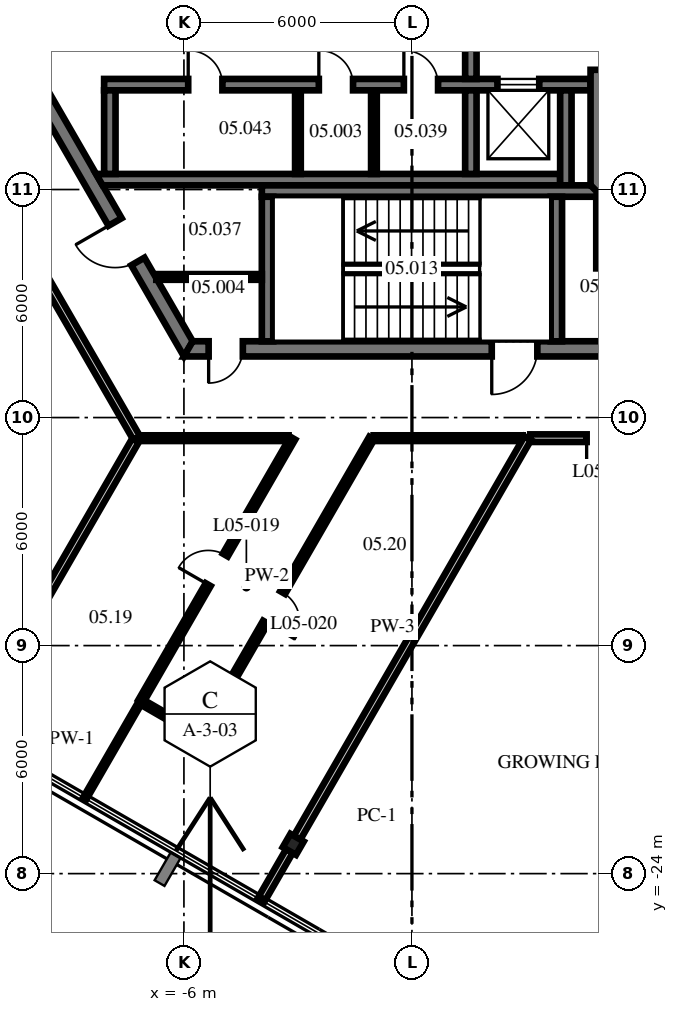
"""IFC4 building model, lengths in metres.
Left out: names, types, materials, properties, quantities, classifications, styles, units other than length and angle.
Written with IfcOpenShell. Run it as: python <this file> out.ifc"""

import sys

from ifc_helpers import new_model, si_unit, direction, frame, frame_2d, origin, origin_2d, place, context, subcontext, project, spatial, polyline, rectangle, i_section, outline, extrude, source, transform, mapped, element, fill, save


model = new_model("IFC4")
c1 = context("Model", 3, precision=1e-05, world=origin(), true_north=direction((0.0, 1.0)))
c2 = subcontext(c1, "Body", "Model", "MODEL_VIEW")
j1 = project(units=[si_unit("LENGTHUNIT", "METRE"), si_unit("PLANEANGLEUNIT", "RADIAN")], contexts=[c1])
p1 = place(None, origin())
s1 = spatial("IfcSite", under=j1, at=p1, CompositionType="ELEMENT")
p2 = place(p1, origin())
s2 = spatial("IfcBuilding", under=s1, at=p2, CompositionType="ELEMENT")
p3 = place(p2, frame((0.0, 0.0, 24.6)))
s3 = spatial("IfcBuildingStorey", under=s2, at=p3, CompositionType="ELEMENT", Elevation=24.6)
m1 = source(origin(), c2, "Body", "SweptSolid", [
    extrude(i_section(OverallWidth=0.404, OverallDepth=0.406, WebThickness=0.027, FlangeThickness=0.044, at=origin_2d()), origin(), (0.0, 0.0, 1.0), 4.3),
])
p4 = place(p3, frame((-3.124, -23.23, 0.0), z_axis=(0.0, 0.0, 1.0), x_axis=(0.866025403784, -0.5, 0.0)))
e1 = element("IfcColumn", 1, at=p4, inside=s3, PredefinedType="COLUMN", context=c2, shape_type="MappedRepresentation", body=[
    mapped(m1, transform((0.0, 0.0, 0.0), scale=1.0)),
])
m2 = source(origin(), c2, "Body", "SweptSolid", [
    extrude(outline(polyline([(-0.115, -0.2), (11.885, -0.2), (11.654, 0.2), (0.115, 0.2), (-0.115, -0.2)])), origin(), (0.0, 0.0, 1.0), 4.1),
])
p5 = place(p3, frame((-11.769, 0.0, 0.0), z_axis=(0.0, 0.0, 1.0), x_axis=(0.499996592174, -0.866027371285, 0.0)))
e2 = element("IfcWall", 2, at=p5, inside=s3, PredefinedType="SHEAR", context=c2, shape_type="MappedRepresentation", body=[
    mapped(m2, transform((0.0, 0.0, 0.0), scale=1.0)),
])
p6 = place(p5, frame((1.405, 0.0, 0.0)))
e3 = element("IfcOpeningElement", 3, at=p6, cuts=e2, PredefinedType="OPENING", context=c2, shape_type="SweptSolid", body=[
    extrude(rectangle(XDim=1.8, YDim=2.1, at=frame_2d((0.9, 1.05))), frame((0.0, 0.21, 0.0), z_axis=(0.0, -1.0, 0.0), x_axis=(1.0, 0.0, 0.0)), (0.0, 0.0, 1.0), 0.42),
])
p7 = place(p5, frame((7.915, 0.0, 0.0)))
e4 = element("IfcOpeningElement", 4, at=p7, cuts=e2, PredefinedType="OPENING", context=c2, shape_type="SweptSolid", body=[
    extrude(rectangle(XDim=1.2, YDim=2.1, at=frame_2d((0.6, 1.05))), frame((0.0, 0.21, 0.0), z_axis=(0.0, -1.0, 0.0), x_axis=(1.0, 0.0, 0.0)), (0.0, 0.0, 1.0), 0.42),
])
p8 = place(p3, frame((-5.885, -10.192, 0.0), z_axis=(0.0, 0.0, 1.0), x_axis=(1.0, 0.0, 0.0)))
e5 = element("IfcWall", 5, at=p8, inside=s3, PredefinedType="SHEAR", context=c2, shape_type="MappedRepresentation", body=[
    mapped(m2, transform((0.0, 0.0, 0.0), scale=1.0)),
])
p9 = place(p8, frame((7.985, 0.0, 0.0)))
e6 = element("IfcOpeningElement", 6, at=p9, cuts=e5, PredefinedType="OPENING", context=c2, shape_type="SweptSolid", body=[
    extrude(rectangle(XDim=1.2, YDim=2.1, at=frame_2d((0.6, 1.05))), frame((0.0, 0.21, 0.0), z_axis=(0.0, -1.0, 0.0), x_axis=(1.0, 0.0, 0.0)), (0.0, 0.0, 1.0), 0.42),
])
p10 = place(p8, frame((0.534, 0.0, 0.0)))
e7 = element("IfcOpeningElement", 7, at=p10, cuts=e5, PredefinedType="OPENING", context=c2, shape_type="SweptSolid", body=[
    extrude(rectangle(XDim=0.9, YDim=2.1, at=frame_2d((0.45, 1.05))), frame((0.0, 0.21, 0.0), z_axis=(0.0, -1.0, 0.0), x_axis=(1.0, 0.0, 0.0)), (0.0, 0.0, 1.0), 0.42),
])
m3 = source(origin(), c2, "Body", "SweptSolid", [
    extrude(rectangle(XDim=12.8, YDim=0.3, at=frame_2d((6.4, 0.0))), origin(), (0.0, 0.0, 1.0), 4.1),
])
p11 = place(p3, frame((-8.1, -3.24, 0.0), z_axis=(0.0, 0.0, 1.0), x_axis=(1.0, 0.0, 0.0)))
e8 = element("IfcWall", 8, at=p11, inside=s3, PredefinedType="SHEAR", context=c2, shape_type="MappedRepresentation", body=[
    mapped(m3, transform((0.0, 0.0, 0.0), scale=1.0)),
])
p12 = place(p11, frame((2.212, 0.0, 0.0)))
e9 = element("IfcOpeningElement", 9, at=p12, cuts=e8, PredefinedType="OPENING", context=c2, shape_type="SweptSolid", body=[
    extrude(rectangle(XDim=0.9, YDim=2.1, at=frame_2d((0.45, 1.05))), frame((0.0, 0.16, 0.0), z_axis=(0.0, -1.0, 0.0), x_axis=(1.0, 0.0, 0.0)), (0.0, 0.0, 1.0), 0.32),
])
p13 = place(p11, frame((5.65, 0.0, 0.0)))
e10 = element("IfcOpeningElement", 10, at=p13, cuts=e8, PredefinedType="OPENING", context=c2, shape_type="SweptSolid", body=[
    extrude(rectangle(XDim=0.9, YDim=2.1, at=frame_2d((0.45, 1.05))), frame((0.0, 0.16, 0.0), z_axis=(0.0, -1.0, 0.0), x_axis=(1.0, 0.0, 0.0)), (0.0, 0.0, 1.0), 0.32),
])
p14 = place(p11, frame((7.887, 0.0, 0.0)))
e11 = element("IfcOpeningElement", 11, at=p14, cuts=e8, PredefinedType="OPENING", context=c2, shape_type="SweptSolid", body=[
    extrude(rectangle(XDim=0.9, YDim=2.1, at=frame_2d((0.45, 1.05))), frame((0.0, 0.16, 0.0), z_axis=(0.0, -1.0, 0.0), x_axis=(1.0, 0.0, 0.0)), (0.0, 0.0, 1.0), 0.32),
])
p15 = place(p11, frame((10.35, 0.0, 0.0)))
e12 = element("IfcOpeningElement", 12, at=p15, cuts=e8, PredefinedType="OPENING", context=c2, shape_type="SweptSolid", body=[
    extrude(rectangle(XDim=1.1, YDim=2.1, at=frame_2d((0.55, 1.05))), frame((0.0, 0.16, 0.0), z_axis=(0.0, -1.0, 0.0), x_axis=(1.0, 0.0, 0.0)), (0.0, 0.0, 1.0), 0.32),
])
m4 = source(origin(), c2, "Body", "SweptSolid", [
    extrude(outline(polyline([(12.0, -0.15), (-0.04, -0.15), (-0.213, 0.15), (12.0, 0.15), (12.0, -0.15)])), origin(), (0.0, 0.0, 1.0), 4.1),
])
p16 = place(p3, frame((-8.1, -5.74, 0.0), z_axis=(0.0, 0.0, 1.0), x_axis=(1.0, 0.0, 0.0)))
e13 = element("IfcWall", 13, at=p16, inside=s3, PredefinedType="SHEAR", context=c2, shape_type="MappedRepresentation", body=[
    mapped(m4, transform((0.0, 0.0, 0.0), scale=1.0)),
])
m5 = source(origin(), c2, "Body", "SweptSolid", [
    extrude(rectangle(XDim=2.2, YDim=0.3, at=frame_2d((1.1, 0.0))), origin(), (0.0, 0.0, 1.0), 4.1),
])
for number, where, z_axis, x_axis in (
    (14, (-7.95, -5.59, 0.0), (0.0, 0.0, 1.0), (0.0, 1.0, 0.0)),
    (15, (1.55, -5.59, 0.0), (0.0, 0.0, 1.0), (0.0, 1.0, 0.0)),
):
    element("IfcWall", number, at=place(p3, frame(where, z_axis=z_axis, x_axis=x_axis)), inside=s3, PredefinedType="SHEAR", context=c2, shape_type="MappedRepresentation", body=[
        mapped(m5, transform((0.0, 0.0, 0.0), scale=1.0)),
    ])
m6 = source(origin(), c2, "Body", "SweptSolid", [
    extrude(rectangle(XDim=2.5, YDim=0.3, at=frame_2d((1.25, 0.0))), origin(), (0.0, 0.0, 1.0), 4.1),
])
p17 = place(p3, frame((4.05, -5.89, 0.0), z_axis=(0.0, 0.0, 1.0), x_axis=(0.0, 1.0, 0.0)))
e16 = element("IfcWall", 16, at=p17, inside=s3, PredefinedType="SHEAR", context=c2, shape_type="MappedRepresentation", body=[
    mapped(m6, transform((0.0, 0.0, 0.0), scale=1.0)),
])
m7 = source(origin(), c2, "Body", "SweptSolid", [
    extrude(rectangle(XDim=3.0, YDim=0.3, at=frame_2d((1.5, 0.0))), origin(), (0.0, 0.0, 1.0), 4.1),
])
p18 = place(p3, frame((1.55, -3.09, 0.0), z_axis=(0.0, 0.0, 1.0), x_axis=(0.0, 1.0, 0.0)))
e17 = element("IfcWall", 17, at=p18, inside=s3, PredefinedType="SHEAR", context=c2, shape_type="MappedRepresentation", body=[
    mapped(m7, transform((0.0, 0.0, 0.0), scale=1.0)),
])
p19 = place(p18, frame((0.9, 0.0, 0.0)))
e18 = element("IfcOpeningElement", 18, at=p19, cuts=e17, PredefinedType="OPENING", context=c2, shape_type="SweptSolid", body=[
    extrude(rectangle(XDim=1.2, YDim=2.1, at=frame_2d((0.6, 1.05))), frame((0.0, 0.16, 0.0), z_axis=(0.0, -1.0, 0.0), x_axis=(1.0, 0.0, 0.0)), (0.0, 0.0, 1.0), 0.32),
])
m8 = source(origin(), c2, "Body", "SweptSolid", [
    extrude(outline(polyline([(-0.15, -0.15), (9.99, -0.15), (9.99, 0.15), (0.15, 0.15), (-0.15, -0.15)])), origin(), (0.0, 0.0, 1.0), 4.1),
])
p20 = place(p3, frame((4.85, -6.04, 0.0), z_axis=(0.0, 0.0, 1.0), x_axis=(0.0, 1.0, 0.0)))
e19 = element("IfcWall", 19, at=p20, inside=s3, PredefinedType="SHEAR", context=c2, shape_type="MappedRepresentation", body=[
    mapped(m8, transform((0.0, 0.0, 0.0), scale=1.0)),
])
p21 = place(p20, frame((3.19, 0.0, 0.0)))
e20 = element("IfcOpeningElement", 20, at=p21, cuts=e19, PredefinedType="OPENING", context=c2, shape_type="SweptSolid", body=[
    extrude(rectangle(XDim=1.1, YDim=2.1, at=frame_2d((0.55, 1.05))), frame((0.0, 0.16, 0.0), z_axis=(0.0, -1.0, 0.0), x_axis=(1.0, 0.0, 0.0)), (0.0, 0.0, 1.0), 0.32),
])
m9 = source(origin(), c2, "Body", "SweptSolid", [
    extrude(outline(polyline([(0.0, -0.15), (8.95, -0.15), (8.65, 0.15), (0.0, 0.15), (0.0, -0.15)])), origin(), (0.0, 0.0, 1.0), 4.1),
])
p22 = place(p3, frame((-3.95, -6.04, 0.0), z_axis=(0.0, 0.0, 1.0), x_axis=(1.0, 0.0, 0.0)))
e21 = element("IfcWall", 21, at=p22, inside=s3, PredefinedType="SHEAR", context=c2, shape_type="MappedRepresentation", body=[
    mapped(m9, transform((0.0, 0.0, 0.0), scale=1.0)),
])
m10 = source(origin(), c2, "Body", "SweptSolid", [
    extrude(outline(polyline([(3.8, -0.15), (-0.004, -0.15), (-0.004, 0.15), (3.8, 0.15), (3.8, -0.15)])), origin(), (0.0, 0.0, 1.0), 4.1),
])
for number, where, z_axis, x_axis in (
    (22, (-3.8, -9.99, 0.0), (0.0, 0.0, 1.0), (0.0, 1.0, 0.0)),
    (23, (3.8, -9.99, 0.0), (0.0, 0.0, 1.0), (0.0, 1.0, 0.0)),
):
    element("IfcWall", number, at=place(p3, frame(where, z_axis=z_axis, x_axis=x_axis)), inside=s3, PredefinedType="SHEAR", context=c2, shape_type="MappedRepresentation", body=[
        mapped(m10, transform((0.0, 0.0, 0.0), scale=1.0)),
    ])
m11 = source(origin(), c2, "Body", "SweptSolid", [
    extrude(rectangle(XDim=2.2, YDim=0.15, at=frame_2d((1.1, 0.0))), origin(), (0.0, 0.0, 1.0), 4.1),
])
for number, where, z_axis, x_axis in (
    (24, (-3.0, -5.59, 0.0), (0.0, 0.0, 1.0), (0.0, 1.0, 0.0)),
    (25, (-1.0, -5.59, 0.0), (0.0, 0.0, 1.0), (0.0, 1.0, 0.0)),
):
    element("IfcWall", number, at=place(p3, frame(where, z_axis=z_axis, x_axis=x_axis)), inside=s3, PredefinedType="PARTITIONING", context=c2, shape_type="MappedRepresentation", body=[
        mapped(m11, transform((0.0, 0.0, 0.0), scale=1.0)),
    ])
m12 = source(origin(), c2, "Body", "SweptSolid", [
    extrude(rectangle(XDim=2.777, YDim=0.15, at=frame_2d((1.389, 0.0))), origin(), (0.0, 0.0, 1.0), 4.1),
])
p23 = place(p3, frame((-6.727, -8.3, 0.0), z_axis=(0.0, 0.0, 1.0), x_axis=(1.0, 0.0, 0.0)))
e26 = element("IfcWall", 26, at=p23, inside=s3, PredefinedType="PARTITIONING", context=c2, shape_type="MappedRepresentation", body=[
    mapped(m12, transform((0.0, 0.0, 0.0), scale=1.0)),
])
m13 = source(origin(), c2, "Body", "SweptSolid", [
    extrude(rectangle(XDim=1.885, YDim=0.15, at=frame_2d((0.942, 0.0))), origin(), (0.0, 0.0, 1.0), 4.1),
])
p24 = place(p3, frame((4.925, -8.075, 0.0), z_axis=(0.0, 0.0, 1.0), x_axis=(0.0, 1.0, 0.0)))
e27 = element("IfcWall", 27, at=p24, inside=s3, PredefinedType="PARTITIONING", context=c2, shape_type="MappedRepresentation", body=[
    mapped(m13, transform((0.0, 0.0, 0.0), scale=1.0)),
])
m14 = source(origin(), c2, "Body", "SweptSolid", [
    extrude(rectangle(XDim=8.229, YDim=0.2, at=frame_2d((4.115, 0.0))), origin(), (0.0, 0.0, 1.0), 4.1),
])
p25 = place(p3, frame((-11.356, -5.416, 0.0), z_axis=(0.0, 0.0, 1.0), x_axis=(0.500012644715, -0.866018103232, 0.0)))
e28 = element("IfcWall", 28, at=p25, inside=s3, PredefinedType="PARTITIONING", context=c2, shape_type="MappedRepresentation", body=[
    mapped(m14, transform((0.0, 0.0, 0.0), scale=1.0)),
])
m15 = source(origin(), c2, "Body", "SweptSolid", [
    extrude(rectangle(XDim=1.69, YDim=0.15, at=frame_2d((0.845, 0.0))), origin(), (0.0, 0.0, 1.0), 4.1),
])
p26 = place(p3, frame((-7.084, -19.5, 0.0), z_axis=(0.0, 0.0, 1.0), x_axis=(0.866002725405, -0.500039278049, 0.0)))
e29 = element("IfcWall", 29, at=p26, inside=s3, PredefinedType="PARTITIONING", context=c2, shape_type="MappedRepresentation", body=[
    mapped(m15, transform((0.0, 0.0, 0.0), scale=1.0)),
])
m16 = source(origin(), c2, "Body", "SweptSolid", [
    extrude(rectangle(XDim=3.925, YDim=0.15, at=frame_2d((1.962, 0.0))), origin(), (0.0, 0.0, 1.0), 4.1),
])
p27 = place(p3, frame((-7.171, -12.542, 0.0), z_axis=(0.0, 0.0, 1.0), x_axis=(1.0, 0.0, 0.0)))
e30 = element("IfcWall", 30, at=p27, inside=s3, PredefinedType="PARTITIONING", context=c2, shape_type="MappedRepresentation", body=[
    mapped(m16, transform((0.0, 0.0, 0.0), scale=1.0)),
])
m17 = source(origin(), c2, "Body", "SweptSolid", [
    extrude(rectangle(XDim=3.921, YDim=0.15, at=frame_2d((1.961, 0.0))), origin(), (0.0, 0.0, 1.0), 4.1),
])
p28 = place(p3, frame((-1.008, -12.542, 0.0), z_axis=(0.0, 0.0, 1.0), x_axis=(1.0, 0.0, 0.0)))
e31 = element("IfcWall", 31, at=p28, inside=s3, PredefinedType="PARTITIONING", context=c2, shape_type="MappedRepresentation", body=[
    mapped(m17, transform((0.0, 0.0, 0.0), scale=1.0)),
])
m18 = source(origin(), c2, "Body", "SweptSolid", [
    extrude(rectangle(XDim=4.098, YDim=0.2, at=frame_2d((2.049, 0.0))), origin(), (0.0, 0.0, 1.0), 4.1),
])
p29 = place(p3, frame((3.114, -12.542, 0.0), z_axis=(0.0, 0.0, 1.0), x_axis=(1.0, 0.0, 0.0)))
e32 = element("IfcWall", 32, at=p29, inside=s3, PredefinedType="PARTITIONING", context=c2, shape_type="MappedRepresentation", body=[
    mapped(m18, transform((0.0, 0.0, 0.0), scale=1.0)),
])
p30 = place(p29, frame((1.483, 0.0, 0.0)))
e33 = element("IfcOpeningElement", 33, at=p30, cuts=e32, PredefinedType="OPENING", context=c2, shape_type="SweptSolid", body=[
    extrude(rectangle(XDim=1.0, YDim=2.1, at=frame_2d((0.5, 1.05))), frame((0.0, 0.11, 0.0), z_axis=(0.0, -1.0, 0.0), x_axis=(1.0, 0.0, 0.0)), (0.0, 0.0, 1.0), 0.22),
])
m19 = source(origin(), c2, "Body", "SweptSolid", [
    extrude(rectangle(XDim=1.499, YDim=0.2, at=frame_2d((0.75, 0.0))), origin(), (0.0, 0.0, 1.0), 4.1),
])
p31 = place(p3, frame((-3.969, -24.695, 0.0), z_axis=(0.0, 0.0, 1.0), x_axis=(0.499905760005, 0.866079806435, 0.0)))
e34 = element("IfcWall", 34, at=p31, inside=s3, PredefinedType="PARTITIONING", context=c2, shape_type="MappedRepresentation", body=[
    mapped(m19, transform((0.0, 0.0, 0.0), scale=1.0)),
])
m20 = source(origin(), c2, "Body", "SweptSolid", [
    extrude(rectangle(XDim=12.148, YDim=0.2, at=frame_2d((6.074, 0.0))), origin(), (0.0, 0.0, 1.0), 3.343),
])
p32 = place(p3, frame((-3.027, -23.063, 0.0), z_axis=(0.0, 0.0, 1.0), x_axis=(0.499997320042, 0.866026951053, 0.0)))
e35 = element("IfcWall", 35, at=p32, inside=s3, PredefinedType="PARTITIONING", context=c2, shape_type="MappedRepresentation", body=[
    mapped(m20, transform((0.0, 0.0, 0.0), scale=1.0)),
])
m21 = source(origin(), c2, "Body", "SweptSolid", [
    extrude(rectangle(XDim=9.039, YDim=0.15, at=frame_2d((4.519, 0.0))), origin(), (0.0, 0.0, 1.0), 4.1),
])
p33 = place(p3, frame((-5.577, -20.37, 0.0), z_axis=(0.0, 0.0, 1.0), x_axis=(0.499999912267, 0.866025454437, 0.0)))
e36 = element("IfcWall", 36, at=p33, inside=s3, PredefinedType="PARTITIONING", context=c2, shape_type="MappedRepresentation", body=[
    mapped(m21, transform((0.0, 0.0, 0.0), scale=1.0)),
])
p34 = place(p33, frame((3.449, 0.0, 0.0)))
e37 = element("IfcOpeningElement", 37, at=p34, cuts=e36, PredefinedType="OPENING", context=c2, shape_type="SweptSolid", body=[
    extrude(rectangle(XDim=0.9, YDim=2.1, at=frame_2d((0.45, 1.05))), frame((0.0, 0.085, 0.0), z_axis=(0.0, -1.0, 0.0), x_axis=(1.0, 0.0, 0.0)), (0.0, 0.0, 1.0), 0.17),
])
m22 = source(origin(), c2, "Body", "SweptSolid", [
    extrude(rectangle(XDim=2.941, YDim=0.1, at=frame_2d((1.47, 0.0))), origin(), (0.0, 0.0, 1.0), 4.1),
])
p35 = place(p3, frame((-8.607, -22.018, 0.0), z_axis=(0.0, 0.0, 1.0), x_axis=(0.500005104963, 0.866022456413, 0.0)))
e38 = element("IfcWall", 38, at=p35, inside=s3, PredefinedType="PARTITIONING", context=c2, shape_type="MappedRepresentation", body=[
    mapped(m22, transform((0.0, 0.0, 0.0), scale=1.0)),
])
m23 = source(origin(), c2, "Body", "SweptSolid", [
    extrude(rectangle(XDim=8.0, YDim=0.15, at=frame_2d((4.0, 0.0))), origin(), (0.0, 0.0, 1.0), 4.1),
])
p36 = place(p3, frame((-7.136, -19.47, 0.0), z_axis=(0.0, 0.0, 1.0), x_axis=(0.500002489515, 0.866023966458, 0.0)))
e39 = element("IfcWall", 39, at=p36, inside=s3, PredefinedType="PARTITIONING", context=c2, shape_type="MappedRepresentation", body=[
    mapped(m23, transform((0.0, 0.0, 0.0), scale=1.0)),
])
p37 = place(p36, frame((3.549, 0.0, 0.0)))
e40 = element("IfcOpeningElement", 40, at=p37, cuts=e39, PredefinedType="OPENING", context=c2, shape_type="SweptSolid", body=[
    extrude(rectangle(XDim=0.9, YDim=2.1, at=frame_2d((0.45, 1.05))), frame((0.0, 0.085, 0.0), z_axis=(0.0, -1.0, 0.0), x_axis=(1.0, 0.0, 0.0)), (0.0, 0.0, 1.0), 0.17),
])
m24 = source(origin(), c2, "Body", "SweptSolid", [
    extrude(rectangle(XDim=6.934, YDim=0.2, at=frame_2d((3.467, 0.0))), origin(), (0.0, 0.0, 1.0), 3.488),
])
p38 = place(p3, frame((-10.743, -18.608, 0.0), z_axis=(0.0, 0.0, 1.0), x_axis=(0.499986605379, 0.866033137035, 0.0)))
e41 = element("IfcWall", 41, at=p38, inside=s3, PredefinedType="PARTITIONING", context=c2, shape_type="MappedRepresentation", body=[
    mapped(m24, transform((0.0, 0.0, 0.0), scale=1.0)),
])
p39 = place(p9, frame((1.2, 0.0, 0.0), z_axis=(0.0, 0.0, 1.0), x_axis=(-1.0, 0.0, 0.0)))
e42 = element("IfcDoor", 42, at=p39, inside=s3, OperationType="SINGLE_SWING_RIGHT", PredefinedType="DOOR", context=c2, shape_type="SweptSolid", body=[
    extrude(rectangle(XDim=1.2, YDim=2.1, at=frame_2d((0.6, 1.05))), frame((0.0, 0.025, 0.0), z_axis=(0.0, -1.0, 0.0), x_axis=(1.0, 0.0, 0.0)), (0.0, 0.0, 1.0), 0.05),
])
fill(e6, e42)
p40 = place(p21, frame((1.1, 0.0, 0.0), z_axis=(0.0, 0.0, 1.0), x_axis=(-1.0, 0.0, 0.0)))
e43 = element("IfcDoor", 43, at=p40, inside=s3, OperationType="SINGLE_SWING_RIGHT", PredefinedType="DOOR", context=c2, shape_type="SweptSolid", body=[
    extrude(rectangle(XDim=1.1, YDim=2.1, at=frame_2d((0.55, 1.05))), frame((0.0, 0.025, 0.0), z_axis=(0.0, -1.0, 0.0), x_axis=(1.0, 0.0, 0.0)), (0.0, 0.0, 1.0), 0.05),
])
fill(e20, e43)
p41 = place(p12, origin())
e44 = element("IfcDoor", 44, at=p41, inside=s3, OperationType="SINGLE_SWING_LEFT", PredefinedType="DOOR", context=c2, shape_type="SweptSolid", body=[
    extrude(rectangle(XDim=0.9, YDim=2.1, at=frame_2d((0.45, 1.05))), frame((0.0, 0.025, 0.0), z_axis=(0.0, -1.0, 0.0), x_axis=(1.0, 0.0, 0.0)), (0.0, 0.0, 1.0), 0.05),
])
fill(e9, e44)
p42 = place(p13, origin())
e45 = element("IfcDoor", 45, at=p42, inside=s3, OperationType="SINGLE_SWING_LEFT", PredefinedType="DOOR", context=c2, shape_type="SweptSolid", body=[
    extrude(rectangle(XDim=0.9, YDim=2.1, at=frame_2d((0.45, 1.05))), frame((0.0, 0.025, 0.0), z_axis=(0.0, -1.0, 0.0), x_axis=(1.0, 0.0, 0.0)), (0.0, 0.0, 1.0), 0.05),
])
fill(e10, e45)
p43 = place(p14, origin())
e46 = element("IfcDoor", 46, at=p43, inside=s3, OperationType="SINGLE_SWING_LEFT", PredefinedType="DOOR", context=c2, shape_type="SweptSolid", body=[
    extrude(rectangle(XDim=0.9, YDim=2.1, at=frame_2d((0.45, 1.05))), frame((0.0, 0.025, 0.0), z_axis=(0.0, -1.0, 0.0), x_axis=(1.0, 0.0, 0.0)), (0.0, 0.0, 1.0), 0.05),
])
fill(e11, e46)
p44 = place(p7, frame((1.2, 0.0, 0.0), z_axis=(0.0, 0.0, 1.0), x_axis=(-1.0, 0.0, 0.0)))
e47 = element("IfcDoor", 47, at=p44, inside=s3, OperationType="SINGLE_SWING_RIGHT", PredefinedType="DOOR", context=c2, shape_type="SweptSolid", body=[
    extrude(rectangle(XDim=1.2, YDim=2.1, at=frame_2d((0.6, 1.05))), frame((0.0, 0.025, 0.0), z_axis=(0.0, -1.0, 0.0), x_axis=(1.0, 0.0, 0.0)), (0.0, 0.0, 1.0), 0.05),
])
fill(e4, e47)
p45 = place(p10, frame((0.9, 0.0, 0.0), z_axis=(0.0, 0.0, 1.0), x_axis=(-1.0, 0.0, 0.0)))
e48 = element("IfcDoor", 48, at=p45, inside=s3, OperationType="SINGLE_SWING_RIGHT", PredefinedType="DOOR", context=c2, shape_type="SweptSolid", body=[
    extrude(rectangle(XDim=0.9, YDim=2.1, at=frame_2d((0.45, 1.05))), frame((0.0, 0.025, 0.0), z_axis=(0.0, -1.0, 0.0), x_axis=(1.0, 0.0, 0.0)), (0.0, 0.0, 1.0), 0.05),
])
fill(e7, e48)
p46 = place(p15, origin())
e49 = element("IfcDoor", 49, at=p46, inside=s3, OperationType="DOUBLE_DOOR_SLIDING", PredefinedType="DOOR", context=c2, shape_type="SweptSolid", body=[
    extrude(rectangle(XDim=1.1, YDim=2.1, at=frame_2d((0.55, 1.05))), frame((0.0, 0.025, 0.0), z_axis=(0.0, -1.0, 0.0), x_axis=(1.0, 0.0, 0.0)), (0.0, 0.0, 1.0), 0.05),
])
fill(e12, e49)
p47 = place(p37, origin())
e50 = element("IfcDoor", 50, at=p47, inside=s3, OperationType="SINGLE_SWING_LEFT", PredefinedType="DOOR", context=c2, shape_type="SweptSolid", body=[
    extrude(rectangle(XDim=0.9, YDim=2.1, at=frame_2d((0.45, 1.05))), frame((0.0, 0.025, 0.0), z_axis=(0.0, -1.0, 0.0), x_axis=(1.0, 0.0, 0.0)), (0.0, 0.0, 1.0), 0.05),
])
fill(e40, e50)
p48 = place(p34, origin())
e51 = element("IfcDoor", 51, at=p48, inside=s3, OperationType="SINGLE_SWING_RIGHT", PredefinedType="DOOR", context=c2, shape_type="SweptSolid", body=[
    extrude(rectangle(XDim=0.9, YDim=2.1, at=frame_2d((0.45, 1.05))), frame((0.0, 0.025, 0.0), z_axis=(0.0, -1.0, 0.0), x_axis=(1.0, 0.0, 0.0)), (0.0, 0.0, 1.0), 0.05),
])
fill(e37, e51)
p49 = place(p30, origin())
e52 = element("IfcDoor", 52, at=p49, inside=s3, OperationType="SINGLE_SWING_RIGHT", PredefinedType="DOOR", context=c2, shape_type="SweptSolid", body=[
    extrude(rectangle(XDim=1.0, YDim=2.1, at=frame_2d((0.5, 1.05))), frame((0.0, 0.025, 0.0), z_axis=(0.0, -1.0, 0.0), x_axis=(1.0, 0.0, 0.0)), (0.0, 0.0, 1.0), 0.05),
])
fill(e33, e52)
save(model, sys.argv[1])
